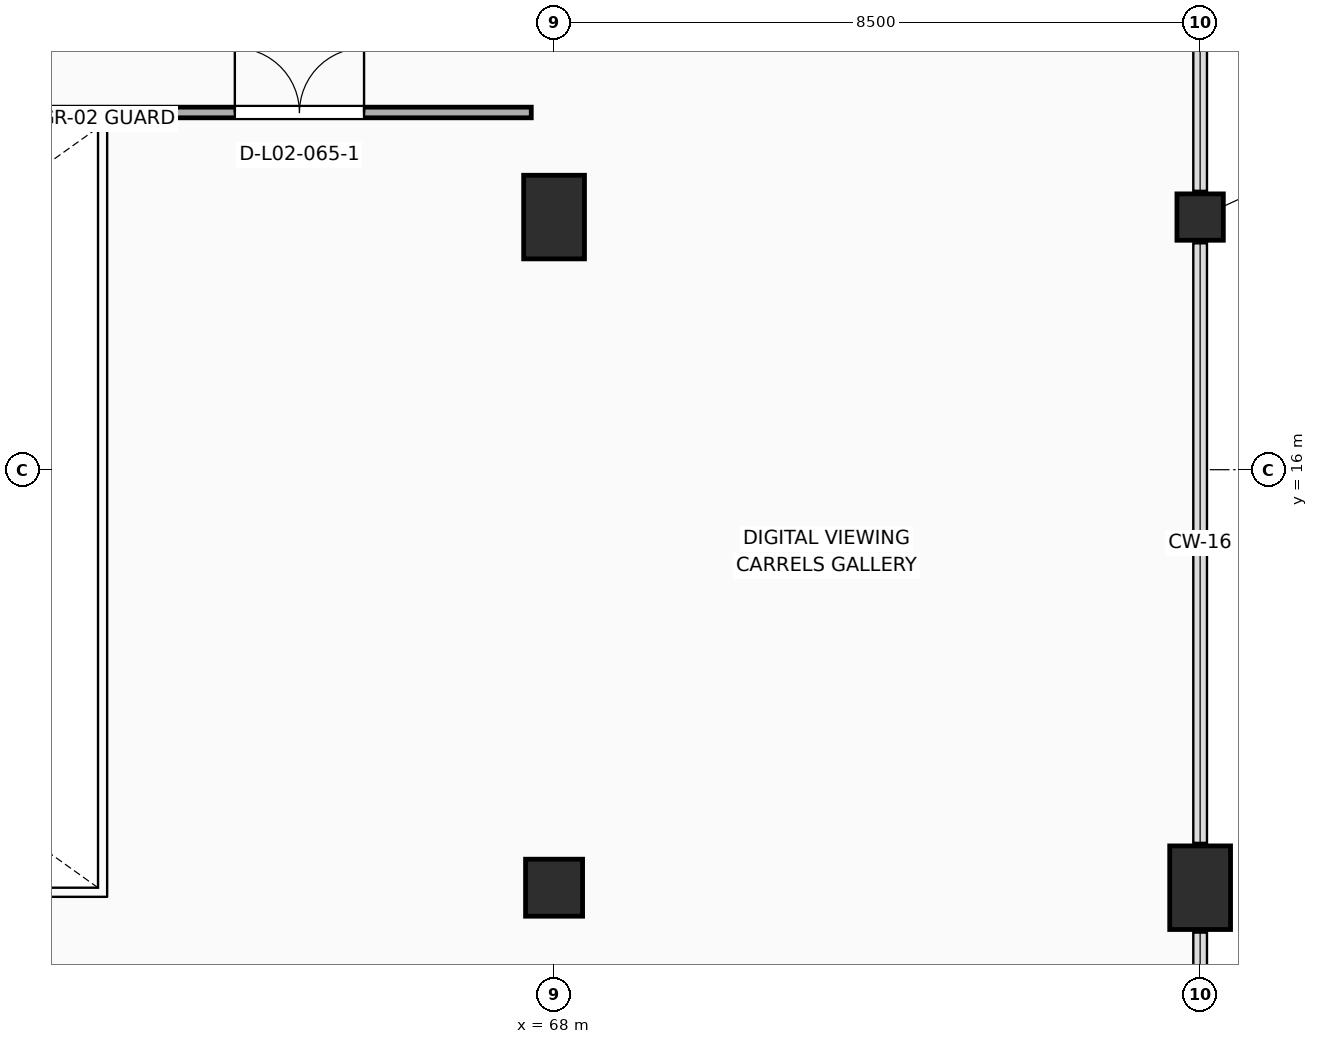
"""IFC4 building model, lengths in metres.
Left out: names, types, materials, properties, quantities, classifications, styles, units other than length and angle.
Written with IfcOpenShell. Run it as: python <this file> out.ifc"""

import sys

from ifc_helpers import new_model, si_unit, direction, frame, frame_2d, origin, origin_2d, place, context, subcontext, project, spatial, rectangle, hollow_circle, extrude, element, fill, save


model = new_model("IFC4")
c1 = context("Model", 3, precision=1e-05, world=origin(), true_north=direction((0.0, 1.0)))
c2 = subcontext(c1, "Body", "Model", "MODEL_VIEW")
j1 = project(units=[si_unit("LENGTHUNIT", "METRE"), si_unit("PLANEANGLEUNIT", "RADIAN")], contexts=[c1])
p1 = place(None, origin())
s1 = spatial("IfcSite", under=j1, at=p1, CompositionType="ELEMENT")
p2 = place(p1, origin())
s2 = spatial("IfcBuilding", under=s1, at=p2, CompositionType="ELEMENT")
p3 = place(p2, frame((0.0, 0.0, 10.2)))
s3 = spatial("IfcBuildingStorey", under=s2, at=p3, CompositionType="ELEMENT", Elevation=10.2)
p4 = place(p3, frame((68.0, 10.5, 0.0), z_axis=(0.0, 0.0, 1.0), x_axis=(1.0, 0.0, 0.0)))
e1 = element("IfcColumn", 1, at=p4, inside=s3, PredefinedType="COLUMN", context=c2, shape_type="SweptSolid", body=[
    extrude(rectangle(XDim=0.75, YDim=0.75, at=origin_2d()), origin(), (0.0, 0.0, 1.0), 4.52),
])
p5 = place(p3, frame((76.5, 10.5, 0.0), z_axis=(0.0, 0.0, 1.0), x_axis=(1.0, 0.0, 0.0)))
e2 = element("IfcColumn", 2, at=p5, inside=s3, PredefinedType="COLUMN", context=c2, shape_type="SweptSolid", body=[
    extrude(rectangle(XDim=0.8, YDim=1.1, at=origin_2d()), origin(), (0.0, 0.0, 1.0), 4.53),
])
p6 = place(p3, frame((68.0, 19.324, 0.0), z_axis=(0.0, 0.0, 1.0), x_axis=(1.0, 0.0, 0.0)))
e3 = element("IfcColumn", 3, at=p6, inside=s3, PredefinedType="COLUMN", context=c2, shape_type="SweptSolid", body=[
    extrude(rectangle(XDim=0.8, YDim=1.1, at=origin_2d()), origin(), (0.0, 0.0, 1.0), 4.52),
])
p7 = place(p3, frame((76.5, 19.324, 0.0), z_axis=(0.0, 0.0, 1.0), x_axis=(1.0, 0.0, 0.0)))
e4 = element("IfcColumn", 4, at=p7, inside=s3, PredefinedType="COLUMN", context=c2, shape_type="SweptSolid", body=[
    extrude(hollow_circle(Radius=0.305, WallThickness=0.02, at=origin_2d()), origin(), (0.0, 0.0, 1.0), 4.53),
])
p8 = place(p3, frame((42.8, 20.7, 0.0), z_axis=(0.0, 0.0, 1.0), x_axis=(1.0, 0.0, 0.0)))
e5 = element("IfcWall", 5, at=p8, inside=s3, PredefinedType="PARTITIONING", context=c2, shape_type="SweptSolid", body=[
    extrude(rectangle(XDim=24.9, YDim=0.14, at=frame_2d((12.45, 0.0))), origin(), (0.0, 0.0, 1.0), 4.062),
])
p9 = place(p8, frame((21.0, 0.0, 0.0)))
e6 = element("IfcOpeningElement", 6, at=p9, cuts=e5, PredefinedType="OPENING", context=c2, shape_type="SweptSolid", body=[
    extrude(rectangle(XDim=1.7, YDim=2.35, at=frame_2d((0.85, 1.175))), frame((0.0, 0.082, 0.0), z_axis=(0.0, -1.0, 0.0), x_axis=(1.0, 0.0, 0.0)), (0.0, 0.0, 1.0), 0.164),
])
p10 = place(p9, origin())
e7 = element("IfcDoor", 7, at=p10, inside=s3, OperationType="DOUBLE_DOOR_SINGLE_SWING", PredefinedType="DOOR", context=c2, shape_type="SweptSolid", body=[
    extrude(rectangle(XDim=1.7, YDim=2.35, at=frame_2d((0.85, 1.175))), frame((0.0, 0.025, 0.0), z_axis=(0.0, -1.0, 0.0), x_axis=(1.0, 0.0, 0.0)), (0.0, 0.0, 1.0), 0.05),
])
fill(e6, e7)
save(model, sys.argv[1])
